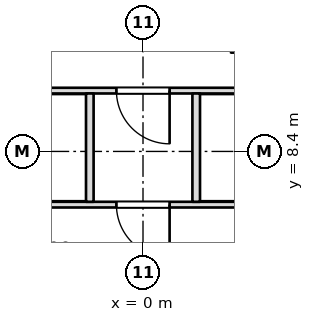
"""IFC4 building model, lengths in metres.
Left out: names, types, materials, properties, quantities, classifications, styles, units other than length and angle.
Written with IfcOpenShell. Run it as: python <this file> out.ifc"""

import sys

from ifc_helpers import new_model, si_unit, direction, frame, frame_2d, origin, place, context, subcontext, project, spatial, rectangle, extrude, element, fill, save


model = new_model("IFC4")
c1 = context("Model", 3, precision=1e-05, world=origin(), true_north=direction((0.0, 1.0)))
c2 = subcontext(c1, "Body", "Model", "MODEL_VIEW")
j1 = project(units=[si_unit("LENGTHUNIT", "METRE"), si_unit("PLANEANGLEUNIT", "RADIAN")], contexts=[c1])
p1 = place(None, origin())
s1 = spatial("IfcSite", under=j1, at=p1, CompositionType="ELEMENT")
p2 = place(p1, origin())
s2 = spatial("IfcBuilding", under=s1, at=p2, CompositionType="ELEMENT")
p3 = place(p2, frame((0.0, 0.0, 48.3)))
s3 = spatial("IfcBuildingStorey", under=s2, at=p3, CompositionType="ELEMENT", Elevation=48.3)
p4 = place(p3, frame((-7.949, 7.0, 0.0), z_axis=(0.0, 0.0, 1.0), x_axis=(1.0, 0.0, 0.0)))
e1 = element("IfcWall", 1, at=p4, inside=s3, PredefinedType="PARTITIONING", context=c2, shape_type="SweptSolid", body=[
    extrude(rectangle(XDim=15.898, YDim=0.15, at=frame_2d((7.949, 0.0))), origin(), (0.0, 0.0, 1.0), 3.13),
])
p5 = place(p4, frame((7.249, 0.0, 0.0)))
e2 = element("IfcOpeningElement", 2, at=p5, cuts=e1, PredefinedType="OPENING", context=c2, shape_type="SweptSolid", body=[
    extrude(rectangle(XDim=1.4, YDim=2.1, at=frame_2d((0.7, 1.05))), frame((0.0, 0.085, 0.0), z_axis=(0.0, -1.0, 0.0), x_axis=(1.0, 0.0, 0.0)), (0.0, 0.0, 1.0), 0.17),
])
p6 = place(p3, frame((-3.6, 10.0, 0.0), z_axis=(0.0, 0.0, 1.0), x_axis=(1.0, 0.0, 0.0)))
e3 = element("IfcWall", 3, at=p6, inside=s3, PredefinedType="PARTITIONING", context=c2, shape_type="SweptSolid", body=[
    extrude(rectangle(XDim=7.2, YDim=0.15, at=frame_2d((3.6, 0.0))), origin(), (0.0, 0.0, 1.0), 3.13),
])
p7 = place(p6, frame((2.9, 0.0, 0.0)))
e4 = element("IfcOpeningElement", 4, at=p7, cuts=e3, PredefinedType="OPENING", context=c2, shape_type="SweptSolid", body=[
    extrude(rectangle(XDim=1.4, YDim=2.1, at=frame_2d((0.7, 1.05))), frame((0.0, 0.085, 0.0), z_axis=(0.0, -1.0, 0.0), x_axis=(1.0, 0.0, 0.0)), (0.0, 0.0, 1.0), 0.17),
])
for number, where, z_axis, x_axis in (
    (5, (-1.4, 7.075, 0.0), (0.0, 0.0, 1.0), (0.0, 1.0, 0.0)),
    (6, (1.4, 7.075, 0.0), (0.0, 0.0, 1.0), (0.0, 1.0, 0.0)),
):
    element("IfcWall", number, at=place(p3, frame(where, z_axis=z_axis, x_axis=x_axis)), inside=s3, PredefinedType="PARTITIONING", context=c2, shape_type="SweptSolid", body=[
        extrude(rectangle(XDim=2.85, YDim=0.2, at=frame_2d((1.425, 0.0))), origin(), (0.0, 0.0, 1.0), 3.13),
    ])
p8 = place(p5, origin())
e7 = element("IfcDoor", 7, at=p8, inside=s3, OperationType="SINGLE_SWING_RIGHT", PredefinedType="DOOR", context=c2, shape_type="SweptSolid", body=[
    extrude(rectangle(XDim=1.4, YDim=2.1, at=frame_2d((0.7, 1.05))), frame((0.0, 0.025, 0.0), z_axis=(0.0, -1.0, 0.0), x_axis=(1.0, 0.0, 0.0)), (0.0, 0.0, 1.0), 0.05),
])
fill(e2, e7)
p9 = place(p7, origin())
e8 = element("IfcDoor", 8, at=p9, inside=s3, OperationType="SINGLE_SWING_RIGHT", PredefinedType="DOOR", context=c2, shape_type="SweptSolid", body=[
    extrude(rectangle(XDim=1.4, YDim=2.1, at=frame_2d((0.7, 1.05))), frame((0.0, 0.025, 0.0), z_axis=(0.0, -1.0, 0.0), x_axis=(1.0, 0.0, 0.0)), (0.0, 0.0, 1.0), 0.05),
])
fill(e4, e8)
save(model, sys.argv[1])
